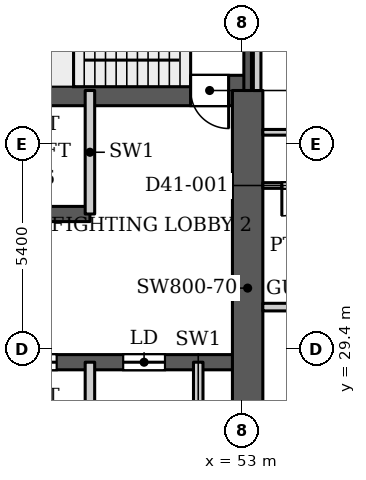
"""IFC4 building model, lengths in metres.
Left out: names, types, materials, properties, quantities, classifications, styles, units other than length and angle.
Written with IfcOpenShell. Run it as: python <this file> out.ifc"""

import sys

from ifc_helpers import new_model, si_unit, direction, frame, frame_2d, origin, place, context, subcontext, project, spatial, rectangle, extrude, source, transform, mapped, element, fill, save


model = new_model("IFC4")
c1 = context("Model", 3, precision=1e-05, world=origin(), true_north=direction((0.0, 1.0)))
c2 = subcontext(c1, "Body", "Model", "MODEL_VIEW")
j1 = project(units=[si_unit("LENGTHUNIT", "METRE"), si_unit("PLANEANGLEUNIT", "RADIAN")], contexts=[c1])
p1 = place(None, origin())
s1 = spatial("IfcSite", under=j1, at=p1, CompositionType="ELEMENT")
p2 = place(p1, origin())
s2 = spatial("IfcBuilding", under=s1, at=p2, CompositionType="ELEMENT")
p3 = place(p2, frame((0.0, 0.0, 176.0)))
s3 = spatial("IfcBuildingStorey", under=s2, at=p3, CompositionType="ELEMENT", Elevation=176.0)
p4 = place(p3, frame((34.75, 29.05, 0.0), z_axis=(0.0, 0.0, 1.0), x_axis=(1.0, 0.0, 0.0)))
e1 = element("IfcWall", 1, at=p4, inside=s3, PredefinedType="SHEAR", context=c2, shape_type="SweptSolid", body=[
    extrude(rectangle(XDim=18.4, YDim=0.4, at=frame_2d((9.2, 0.0))), origin(), (0.0, 0.0, 1.0), 3.9),
])
p5 = place(p4, frame((0.875, 0.0, 0.0)))
e2 = element("IfcOpeningElement", 2, at=p5, cuts=e1, PredefinedType="OPENING", context=c2, shape_type="SweptSolid", body=[
    extrude(rectangle(XDim=1.1, YDim=2.2, at=frame_2d((0.55, 1.1))), frame((0.0, 0.21, 0.0), z_axis=(0.0, -1.0, 0.0), x_axis=(1.0, 0.0, 0.0)), (0.0, 0.0, 1.0), 0.42),
])
p6 = place(p4, frame((3.725, 0.0, 0.0)))
e3 = element("IfcOpeningElement", 3, at=p6, cuts=e1, PredefinedType="OPENING", context=c2, shape_type="SweptSolid", body=[
    extrude(rectangle(XDim=1.1, YDim=2.2, at=frame_2d((0.55, 1.1))), frame((0.0, 0.21, 0.0), z_axis=(0.0, -1.0, 0.0), x_axis=(1.0, 0.0, 0.0)), (0.0, 0.0, 1.0), 0.42),
])
p7 = place(p4, frame((6.575, 0.0, 0.0)))
e4 = element("IfcOpeningElement", 4, at=p7, cuts=e1, PredefinedType="OPENING", context=c2, shape_type="SweptSolid", body=[
    extrude(rectangle(XDim=1.1, YDim=2.2, at=frame_2d((0.55, 1.1))), frame((0.0, 0.21, 0.0), z_axis=(0.0, -1.0, 0.0), x_axis=(1.0, 0.0, 0.0)), (0.0, 0.0, 1.0), 0.42),
])
p8 = place(p4, frame((9.425, 0.0, 0.0)))
e5 = element("IfcOpeningElement", 5, at=p8, cuts=e1, PredefinedType="OPENING", context=c2, shape_type="SweptSolid", body=[
    extrude(rectangle(XDim=1.1, YDim=2.2, at=frame_2d((0.55, 1.1))), frame((0.0, 0.21, 0.0), z_axis=(0.0, -1.0, 0.0), x_axis=(1.0, 0.0, 0.0)), (0.0, 0.0, 1.0), 0.42),
])
p9 = place(p4, frame((12.275, 0.0, 0.0)))
e6 = element("IfcOpeningElement", 6, at=p9, cuts=e1, PredefinedType="OPENING", context=c2, shape_type="SweptSolid", body=[
    extrude(rectangle(XDim=1.1, YDim=2.2, at=frame_2d((0.55, 1.1))), frame((0.0, 0.21, 0.0), z_axis=(0.0, -1.0, 0.0), x_axis=(1.0, 0.0, 0.0)), (0.0, 0.0, 1.0), 0.42),
])
p10 = place(p4, frame((15.125, 0.0, 0.0)))
e7 = element("IfcOpeningElement", 7, at=p10, cuts=e1, PredefinedType="OPENING", context=c2, shape_type="SweptSolid", body=[
    extrude(rectangle(XDim=1.1, YDim=2.2, at=frame_2d((0.55, 1.1))), frame((0.0, 0.21, 0.0), z_axis=(0.0, -1.0, 0.0), x_axis=(1.0, 0.0, 0.0)), (0.0, 0.0, 1.0), 0.42),
])
p11 = place(p3, frame((34.75, 32.95, 0.0), z_axis=(0.0, 0.0, 1.0), x_axis=(1.0, 0.0, 0.0)))
e8 = element("IfcWall", 8, at=p11, inside=s3, PredefinedType="SHEAR", context=c2, shape_type="SweptSolid", body=[
    extrude(rectangle(XDim=14.25, YDim=0.4, at=frame_2d((7.125, 0.0))), origin(), (0.0, 0.0, 1.0), 3.9),
])
p12 = place(p3, frame((34.75, 36.2, 0.0), z_axis=(0.0, 0.0, 1.0), x_axis=(1.0, 0.0, 0.0)))
e9 = element("IfcWall", 9, at=p12, inside=s3, PredefinedType="SHEAR", context=c2, shape_type="SweptSolid", body=[
    extrude(rectangle(XDim=18.4, YDim=0.8, at=frame_2d((9.2, 0.0))), origin(), (0.0, 0.0, 1.0), 3.9),
])
p13 = place(p12, frame((16.9, 0.0, 0.0)))
e10 = element("IfcOpeningElement", 10, at=p13, cuts=e9, PredefinedType="OPENING", context=c2, shape_type="SweptSolid", body=[
    extrude(rectangle(XDim=1.0, YDim=2.2, at=frame_2d((0.5, 1.1))), frame((0.0, 0.41, 0.0), z_axis=(0.0, -1.0, 0.0), x_axis=(1.0, 0.0, 0.0)), (0.0, 0.0, 1.0), 0.82),
])
p14 = place(p3, frame((53.15, 25.8, 0.0), z_axis=(0.0, 0.0, 1.0), x_axis=(0.0, 1.0, 0.0)))
e11 = element("IfcWall", 11, at=p14, inside=s3, PredefinedType="SHEAR", context=c2, shape_type="SweptSolid", body=[
    extrude(rectangle(XDim=10.4, YDim=0.8, at=frame_2d((5.2, 0.0))), origin(), (0.0, 0.0, 1.0), 3.9),
])
p15 = place(p3, frame((53.15, 36.2, 0.0), z_axis=(0.0, 0.0, 1.0), x_axis=(0.0, 1.0, 0.0)))
e12 = element("IfcWall", 12, at=p15, inside=s3, PredefinedType="SHEAR", context=c2, shape_type="SweptSolid", body=[
    extrude(rectangle(XDim=3.15, YDim=0.2, at=frame_2d((1.575, 0.0))), origin(), (0.0, 0.0, 1.0), 3.9),
])
for number, where, z_axis, x_axis in (
    (13, (49.0, 25.8, 0.0), (0.0, 0.0, 1.0), (0.0, 1.0, 0.0)),
    (14, (49.0, 32.95, 0.0), (0.0, 0.0, 1.0), (0.0, 1.0, 0.0)),
    (15, (51.85, 25.8, 0.0), (0.0, 0.0, 1.0), (0.0, 1.0, 0.0)),
):
    element("IfcWall", number, at=place(p3, frame(where, z_axis=z_axis, x_axis=x_axis)), inside=s3, PredefinedType="PARTITIONING", context=c2, shape_type="SweptSolid", body=[
        extrude(rectangle(XDim=3.25, YDim=0.25, at=frame_2d((1.625, 0.0))), origin(), (0.0, 0.0, 1.0), 3.9),
    ])
p16 = place(p3, frame((53.4, 36.199, 0.0), z_axis=(0.0, 0.0, 1.0), x_axis=(0.0, 1.0, 0.0)))
e16 = element("IfcWall", 16, at=p16, inside=s3, PredefinedType="PARTITIONING", context=c2, shape_type="SweptSolid", body=[
    extrude(rectangle(XDim=7.701, YDim=0.2, at=frame_2d((3.851, 0.0))), origin(), (0.0, 0.0, 1.0), 3.6),
])
p17 = place(p3, frame((53.549, 30.5, 0.0), z_axis=(0.0, 0.0, 1.0), x_axis=(1.0, 0.0, 0.0)))
e17 = element("IfcWall", 17, at=p17, inside=s3, PredefinedType="PARTITIONING", context=c2, shape_type="SweptSolid", body=[
    extrude(rectangle(XDim=44.551, YDim=0.2, at=frame_2d((22.275, 0.0))), origin(), (0.0, 0.0, 1.0), 3.6),
])
p18 = place(p17, frame((6.851, 0.0, 0.0)))
e18 = element("IfcOpeningElement", 18, at=p18, cuts=e17, PredefinedType="OPENING", context=c2, shape_type="SweptSolid", body=[
    extrude(rectangle(XDim=1.0, YDim=2.1, at=frame_2d((0.5, 1.05))), frame((0.0, 0.11, 0.0), z_axis=(0.0, -1.0, 0.0), x_axis=(1.0, 0.0, 0.0)), (0.0, 0.0, 1.0), 0.22),
])
p19 = place(p17, frame((13.451, 0.0, 0.0)))
e19 = element("IfcOpeningElement", 19, at=p19, cuts=e17, PredefinedType="OPENING", context=c2, shape_type="SweptSolid", body=[
    extrude(rectangle(XDim=1.0, YDim=2.1, at=frame_2d((0.5, 1.05))), frame((0.0, 0.11, 0.0), z_axis=(0.0, -1.0, 0.0), x_axis=(1.0, 0.0, 0.0)), (0.0, 0.0, 1.0), 0.22),
])
p20 = place(p17, frame((24.701, 0.0, 0.0)))
e20 = element("IfcOpeningElement", 20, at=p20, cuts=e17, PredefinedType="OPENING", context=c2, shape_type="SweptSolid", body=[
    extrude(rectangle(XDim=1.0, YDim=2.1, at=frame_2d((0.5, 1.05))), frame((0.0, 0.11, 0.0), z_axis=(0.0, -1.0, 0.0), x_axis=(1.0, 0.0, 0.0)), (0.0, 0.0, 1.0), 0.22),
])
p21 = place(p17, frame((38.651, 0.0, 0.0)))
e21 = element("IfcOpeningElement", 21, at=p21, cuts=e17, PredefinedType="OPENING", context=c2, shape_type="SweptSolid", body=[
    extrude(rectangle(XDim=1.0, YDim=2.1, at=frame_2d((0.5, 1.05))), frame((0.0, 0.11, 0.0), z_axis=(0.0, -1.0, 0.0), x_axis=(1.0, 0.0, 0.0)), (0.0, 0.0, 1.0), 0.22),
])
p22 = place(p3, frame((53.549, 33.7, 0.0), z_axis=(0.0, 0.0, 1.0), x_axis=(1.0, 0.0, 0.0)))
e22 = element("IfcWall", 22, at=p22, inside=s3, PredefinedType="PARTITIONING", context=c2, shape_type="SweptSolid", body=[
    extrude(rectangle(XDim=6.501, YDim=0.15, at=frame_2d((3.25, 0.0))), origin(), (0.0, 0.0, 1.0), 3.6),
])
p23 = place(p22, frame((0.501, 0.0, 0.0)))
e23 = element("IfcOpeningElement", 23, at=p23, cuts=e22, PredefinedType="OPENING", context=c2, shape_type="SweptSolid", body=[
    extrude(rectangle(XDim=0.8, YDim=2.1, at=frame_2d((0.4, 1.05))), frame((0.0, 0.085, 0.0), z_axis=(0.0, -1.0, 0.0), x_axis=(1.0, 0.0, 0.0)), (0.0, 0.0, 1.0), 0.17),
])
p24 = place(p22, frame((4.501, 0.0, 0.0)))
e24 = element("IfcOpeningElement", 24, at=p24, cuts=e22, PredefinedType="OPENING", context=c2, shape_type="SweptSolid", body=[
    extrude(rectangle(XDim=0.9, YDim=2.1, at=frame_2d((0.45, 1.05))), frame((0.0, 0.085, 0.0), z_axis=(0.0, -1.0, 0.0), x_axis=(1.0, 0.0, 0.0)), (0.0, 0.0, 1.0), 0.17),
])
p25 = place(p22, frame((2.301, 0.0, 0.0)))
e25 = element("IfcOpeningElement", 25, at=p25, cuts=e22, PredefinedType="OPENING", context=c2, shape_type="SweptSolid", body=[
    extrude(rectangle(XDim=0.8, YDim=2.1, at=frame_2d((0.4, 1.05))), frame((0.0, 0.085, 0.0), z_axis=(0.0, -1.0, 0.0), x_axis=(1.0, 0.0, 0.0)), (0.0, 0.0, 1.0), 0.17),
])
p26 = place(p3, frame((53.549, 35.1, 0.0), z_axis=(0.0, 0.0, 1.0), x_axis=(1.0, 0.0, 0.0)))
e26 = element("IfcWall", 26, at=p26, inside=s3, PredefinedType="PARTITIONING", context=c2, shape_type="SweptSolid", body=[
    extrude(rectangle(XDim=9.651, YDim=0.15, at=frame_2d((4.825, 0.0))), origin(), (0.0, 0.0, 1.0), 3.6),
])
p27 = place(p26, frame((7.651, 0.0, 0.0)))
e27 = element("IfcOpeningElement", 27, at=p27, cuts=e26, PredefinedType="OPENING", context=c2, shape_type="SweptSolid", body=[
    extrude(rectangle(XDim=0.9, YDim=2.1, at=frame_2d((0.45, 1.05))), frame((0.0, 0.085, 0.0), z_axis=(0.0, -1.0, 0.0), x_axis=(1.0, 0.0, 0.0)), (0.0, 0.0, 1.0), 0.17),
])
p28 = place(p26, frame((2.651, 0.0, 0.0)))
e28 = element("IfcOpeningElement", 28, at=p28, cuts=e26, PredefinedType="OPENING", context=c2, shape_type="SweptSolid", body=[
    extrude(rectangle(XDim=1.0, YDim=2.1, at=frame_2d((0.5, 1.05))), frame((0.0, 0.085, 0.0), z_axis=(0.0, -1.0, 0.0), x_axis=(1.0, 0.0, 0.0)), (0.0, 0.0, 1.0), 0.17),
])
m1 = source(origin(), c2, "Body", "SweptSolid", [
    extrude(rectangle(XDim=1.1, YDim=2.2, at=frame_2d((0.55, 1.1))), frame((0.0, 0.025, 0.0), z_axis=(0.0, -1.0, 0.0), x_axis=(1.0, 0.0, 0.0)), (0.0, 0.0, 1.0), 0.05),
])
p29 = place(p9, origin())
e29 = element("IfcDoor", 29, at=p29, inside=s3, OperationType="SLIDING_TO_LEFT", PredefinedType="DOOR", context=c2, shape_type="MappedRepresentation", body=[
    mapped(m1, transform((0.0, 0.0, 0.0), x_axis=(1.0, 0.0, 0.0), y_axis=(0.0, 1.0, 0.0), z_axis=(0.0, 0.0, 1.0), scale=1.0)),
])
fill(e6, e29)
p30 = place(p10, origin())
e30 = element("IfcDoor", 30, at=p30, inside=s3, OperationType="SLIDING_TO_LEFT", PredefinedType="DOOR", context=c2, shape_type="MappedRepresentation", body=[
    mapped(m1, transform((0.0, 0.0, 0.0), x_axis=(1.0, 0.0, 0.0), y_axis=(0.0, 1.0, 0.0), z_axis=(0.0, 0.0, 1.0), scale=1.0)),
])
fill(e7, e30)
m2 = source(origin(), c2, "Body", "SweptSolid", [
    extrude(rectangle(XDim=1.0, YDim=2.2, at=frame_2d((0.5, 1.1))), frame((0.0, 0.025, 0.0), z_axis=(0.0, -1.0, 0.0), x_axis=(1.0, 0.0, 0.0)), (0.0, 0.0, 1.0), 0.05),
])
p31 = place(p13, origin())
e31 = element("IfcDoor", 31, at=p31, inside=s3, OperationType="SINGLE_SWING_RIGHT", PredefinedType="DOOR", context=c2, shape_type="MappedRepresentation", body=[
    mapped(m2, transform((0.0, 0.0, 0.0), x_axis=(1.0, 0.0, 0.0), y_axis=(0.0, 1.0, 0.0), z_axis=(0.0, 0.0, 1.0), scale=1.0)),
])
fill(e10, e31)
m3 = source(origin(), c2, "Body", "SweptSolid", [
    extrude(rectangle(XDim=0.8, YDim=2.1, at=frame_2d((0.4, 1.05))), frame((0.0, 0.025, 0.0), z_axis=(0.0, -1.0, 0.0), x_axis=(1.0, 0.0, 0.0)), (0.0, 0.0, 1.0), 0.05),
])
p32 = place(p23, origin())
e32 = element("IfcDoor", 32, at=p32, inside=s3, OperationType="SINGLE_SWING_RIGHT", PredefinedType="DOOR", context=c2, shape_type="MappedRepresentation", body=[
    mapped(m3, transform((0.0, 0.0, 0.0), x_axis=(1.0, 0.0, 0.0), y_axis=(0.0, 1.0, 0.0), z_axis=(0.0, 0.0, 1.0), scale=1.0)),
])
fill(e23, e32)
save(model, sys.argv[1])
